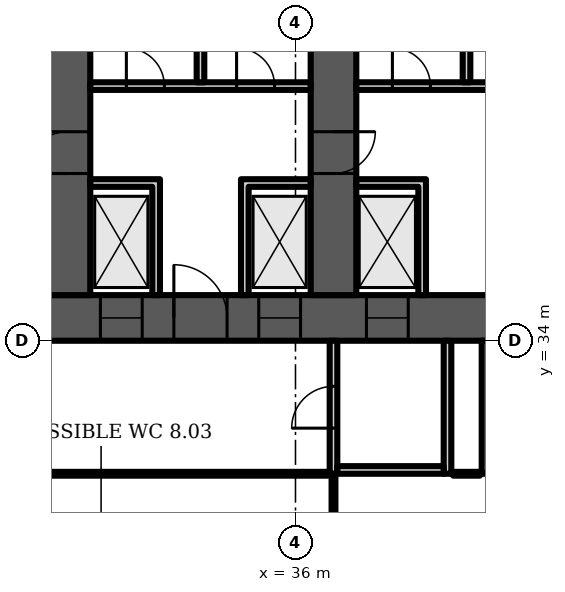
"""IFC4 building model, lengths in metres.
Left out: names, types, materials, properties, quantities, classifications, styles, units other than length and angle.
Written with IfcOpenShell. Run it as: python <this file> out.ifc"""

import sys

from ifc_helpers import new_model, si_unit, direction, frame, frame_2d, origin, place, context, subcontext, project, spatial, polyline, rectangle, outline, extrude, element, fill, save


model = new_model("IFC4")
c1 = context("Model", 3, precision=1e-05, world=origin(), true_north=direction((0.0, 1.0)))
c2 = subcontext(c1, "Body", "Model", "MODEL_VIEW")
j1 = project(units=[si_unit("LENGTHUNIT", "METRE"), si_unit("PLANEANGLEUNIT", "RADIAN")], contexts=[c1])
p1 = place(None, origin())
s1 = spatial("IfcSite", under=j1, at=p1, CompositionType="ELEMENT")
p2 = place(p1, origin())
s2 = spatial("IfcBuilding", under=s1, at=p2, CompositionType="ELEMENT")
p3 = place(p2, frame((0.0, 0.0, 48.7)))
s3 = spatial("IfcBuildingStorey", under=s2, at=p3, CompositionType="ELEMENT", Elevation=48.7)
p4 = place(p3, frame((9.0, 34.6, 0.0), z_axis=(0.0, 0.0, 1.0), x_axis=(1.0, 0.0, 0.0)))
e1 = element("IfcWall", 1, at=p4, inside=s3, PredefinedType="SHEAR", context=c2, shape_type="SweptSolid", body=[
    extrude(rectangle(XDim=56.0, YDim=1.2, at=frame_2d((28.0, 0.0))), origin(), (0.0, 0.0, 1.0), 3.6),
])
p5 = place(p4, frame((3.3, 0.0, 0.0)))
e2 = element("IfcOpeningElement", 2, at=p5, cuts=e1, PredefinedType="OPENING", context=c2, shape_type="SweptSolid", body=[
    extrude(rectangle(XDim=1.0, YDim=2.1, at=frame_2d((0.5, 1.05))), frame((0.0, 0.61, 0.0), z_axis=(0.0, -1.0, 0.0), x_axis=(1.0, 0.0, 0.0)), (0.0, 0.0, 1.0), 1.22),
])
p6 = place(p4, frame((7.867, 0.0, 0.0)))
e3 = element("IfcOpeningElement", 3, at=p6, cuts=e1, PredefinedType="OPENING", context=c2, shape_type="SweptSolid", body=[
    extrude(rectangle(XDim=1.1, YDim=2.1, at=frame_2d((0.55, 1.05))), frame((0.0, 0.61, 0.0), z_axis=(0.0, -1.0, 0.0), x_axis=(1.0, 0.0, 0.0)), (0.0, 0.0, 1.0), 1.22),
])
p7 = place(p4, frame((12.033, 0.0, 0.0)))
e4 = element("IfcOpeningElement", 4, at=p7, cuts=e1, PredefinedType="OPENING", context=c2, shape_type="SweptSolid", body=[
    extrude(rectangle(XDim=1.1, YDim=2.1, at=frame_2d((0.55, 1.05))), frame((0.0, 0.61, 0.0), z_axis=(0.0, -1.0, 0.0), x_axis=(1.0, 0.0, 0.0)), (0.0, 0.0, 1.0), 1.22),
])
p8 = place(p4, frame((9.8, 0.0, 0.0)))
e5 = element("IfcOpeningElement", 5, at=p8, cuts=e1, PredefinedType="OPENING", context=c2, shape_type="SweptSolid", body=[
    extrude(rectangle(XDim=1.4, YDim=2.1, at=frame_2d((0.7, 1.05))), frame((0.0, 0.61, 0.0), z_axis=(0.0, -1.0, 0.0), x_axis=(1.0, 0.0, 0.0)), (0.0, 0.0, 1.0), 1.22),
])
p9 = place(p4, frame((14.65, 0.0, 0.0)))
e6 = element("IfcOpeningElement", 6, at=p9, cuts=e1, PredefinedType="OPENING", context=c2, shape_type="SweptSolid", body=[
    extrude(rectangle(XDim=1.2, YDim=2.1, at=frame_2d((0.6, 1.05))), frame((0.0, 0.61, 0.0), z_axis=(0.0, -1.0, 0.0), x_axis=(1.0, 0.0, 0.0)), (0.0, 0.0, 1.0), 1.22),
])
p10 = place(p4, frame((21.867, 0.0, 0.0)))
e7 = element("IfcOpeningElement", 7, at=p10, cuts=e1, PredefinedType="OPENING", context=c2, shape_type="SweptSolid", body=[
    extrude(rectangle(XDim=1.1, YDim=2.1, at=frame_2d((0.55, 1.05))), frame((0.0, 0.61, 0.0), z_axis=(0.0, -1.0, 0.0), x_axis=(1.0, 0.0, 0.0)), (0.0, 0.0, 1.0), 1.22),
])
p11 = place(p4, frame((26.033, 0.0, 0.0)))
e8 = element("IfcOpeningElement", 8, at=p11, cuts=e1, PredefinedType="OPENING", context=c2, shape_type="SweptSolid", body=[
    extrude(rectangle(XDim=1.1, YDim=2.1, at=frame_2d((0.55, 1.05))), frame((0.0, 0.61, 0.0), z_axis=(0.0, -1.0, 0.0), x_axis=(1.0, 0.0, 0.0)), (0.0, 0.0, 1.0), 1.22),
])
p12 = place(p4, frame((23.8, 0.0, 0.0)))
e9 = element("IfcOpeningElement", 9, at=p12, cuts=e1, PredefinedType="OPENING", context=c2, shape_type="SweptSolid", body=[
    extrude(rectangle(XDim=1.4, YDim=2.1, at=frame_2d((0.7, 1.05))), frame((0.0, 0.61, 0.0), z_axis=(0.0, -1.0, 0.0), x_axis=(1.0, 0.0, 0.0)), (0.0, 0.0, 1.0), 1.22),
])
p13 = place(p4, frame((28.867, 0.0, 0.0)))
e10 = element("IfcOpeningElement", 10, at=p13, cuts=e1, PredefinedType="OPENING", context=c2, shape_type="SweptSolid", body=[
    extrude(rectangle(XDim=1.1, YDim=2.1, at=frame_2d((0.55, 1.05))), frame((0.0, 0.61, 0.0), z_axis=(0.0, -1.0, 0.0), x_axis=(1.0, 0.0, 0.0)), (0.0, 0.0, 1.0), 1.22),
])
p14 = place(p4, frame((33.033, 0.0, 0.0)))
e11 = element("IfcOpeningElement", 11, at=p14, cuts=e1, PredefinedType="OPENING", context=c2, shape_type="SweptSolid", body=[
    extrude(rectangle(XDim=1.1, YDim=2.1, at=frame_2d((0.55, 1.05))), frame((0.0, 0.61, 0.0), z_axis=(0.0, -1.0, 0.0), x_axis=(1.0, 0.0, 0.0)), (0.0, 0.0, 1.0), 1.22),
])
p15 = place(p4, frame((40.15, 0.0, 0.0)))
e12 = element("IfcOpeningElement", 12, at=p15, cuts=e1, PredefinedType="OPENING", context=c2, shape_type="SweptSolid", body=[
    extrude(rectangle(XDim=1.2, YDim=2.1, at=frame_2d((0.6, 1.05))), frame((0.0, 0.61, 0.0), z_axis=(0.0, -1.0, 0.0), x_axis=(1.0, 0.0, 0.0)), (0.0, 0.0, 1.0), 1.22),
])
p16 = place(p4, frame((44.8, 0.0, 0.0)))
e13 = element("IfcOpeningElement", 13, at=p16, cuts=e1, PredefinedType="OPENING", context=c2, shape_type="SweptSolid", body=[
    extrude(rectangle(XDim=1.4, YDim=2.1, at=frame_2d((0.7, 1.05))), frame((0.0, 0.61, 0.0), z_axis=(0.0, -1.0, 0.0), x_axis=(1.0, 0.0, 0.0)), (0.0, 0.0, 1.0), 1.22),
])
p17 = place(p4, frame((49.867, 0.0, 0.0)))
e14 = element("IfcOpeningElement", 14, at=p17, cuts=e1, PredefinedType="OPENING", context=c2, shape_type="SweptSolid", body=[
    extrude(rectangle(XDim=1.1, YDim=2.1, at=frame_2d((0.55, 1.05))), frame((0.0, 0.61, 0.0), z_axis=(0.0, -1.0, 0.0), x_axis=(1.0, 0.0, 0.0)), (0.0, 0.0, 1.0), 1.22),
])
p18 = place(p4, frame((53.5, 0.0, 0.0)))
e15 = element("IfcOpeningElement", 15, at=p18, cuts=e1, PredefinedType="OPENING", context=c2, shape_type="SweptSolid", body=[
    extrude(rectangle(XDim=1.1, YDim=2.1, at=frame_2d((0.55, 1.05))), frame((0.0, 0.61, 0.0), z_axis=(0.0, -1.0, 0.0), x_axis=(1.0, 0.0, 0.0)), (0.0, 0.0, 1.0), 1.22),
])
p19 = place(p4, frame((51.567, 0.0, 0.0)))
e16 = element("IfcOpeningElement", 16, at=p19, cuts=e1, PredefinedType="OPENING", context=c2, shape_type="SweptSolid", body=[
    extrude(rectangle(XDim=1.4, YDim=2.1, at=frame_2d((0.7, 1.05))), frame((0.0, 0.61, 0.0), z_axis=(0.0, -1.0, 0.0), x_axis=(1.0, 0.0, 0.0)), (0.0, 0.0, 1.0), 1.22),
])
p20 = place(p3, frame((30.0, 35.2, 0.0), z_axis=(0.0, 0.0, 1.0), x_axis=(0.0, 1.0, 0.0)))
e17 = element("IfcWall", 17, at=p20, inside=s3, PredefinedType="SHEAR", context=c2, shape_type="SweptSolid", body=[
    extrude(rectangle(XDim=14.168, YDim=1.2, at=frame_2d((7.084, 0.0))), origin(), (0.0, 0.0, 1.0), 3.6),
])
p21 = place(p20, frame((3.2, 0.0, 0.0)))
e18 = element("IfcOpeningElement", 18, at=p21, cuts=e17, PredefinedType="OPENING", context=c2, shape_type="SweptSolid", body=[
    extrude(rectangle(XDim=1.1, YDim=2.1, at=frame_2d((0.55, 1.05))), frame((0.0, 0.61, 0.0), z_axis=(0.0, -1.0, 0.0), x_axis=(1.0, 0.0, 0.0)), (0.0, 0.0, 1.0), 1.22),
])
p22 = place(p3, frame((37.0, 35.2, 0.0), z_axis=(0.0, 0.0, 1.0), x_axis=(0.0, 1.0, 0.0)))
e19 = element("IfcWall", 19, at=p22, inside=s3, PredefinedType="SHEAR", context=c2, shape_type="SweptSolid", body=[
    extrude(rectangle(XDim=14.78, YDim=1.2, at=frame_2d((7.39, 0.0))), origin(), (0.0, 0.0, 1.0), 3.6),
])
p23 = place(p22, frame((3.2, 0.0, 0.0)))
e20 = element("IfcOpeningElement", 20, at=p23, cuts=e19, PredefinedType="OPENING", context=c2, shape_type="SweptSolid", body=[
    extrude(rectangle(XDim=1.1, YDim=2.1, at=frame_2d((0.55, 1.05))), frame((0.0, 0.61, 0.0), z_axis=(0.0, -1.0, 0.0), x_axis=(1.0, 0.0, 0.0)), (0.0, 0.0, 1.0), 1.22),
])
p24 = place(p22, frame((9.6, 0.0, 0.0)))
e21 = element("IfcOpeningElement", 21, at=p24, cuts=e19, PredefinedType="OPENING", context=c2, shape_type="SweptSolid", body=[
    extrude(rectangle(XDim=1.0, YDim=2.1, at=frame_2d((0.5, 1.05))), frame((0.0, 0.61, 0.0), z_axis=(0.0, -1.0, 0.0), x_axis=(1.0, 0.0, 0.0)), (0.0, 0.0, 1.0), 1.22),
])
p25 = place(p3, frame((30.6, 40.7, 0.0), z_axis=(0.0, 0.0, 1.0), x_axis=(1.0, 0.0, 0.0)))
e22 = element("IfcWall", 22, at=p25, inside=s3, PredefinedType="PARTITIONING", context=c2, shape_type="SweptSolid", body=[
    extrude(rectangle(XDim=5.8, YDim=0.2, at=frame_2d((2.9, 0.0))), origin(), (0.0, 0.0, 1.0), 3.2),
])
p26 = place(p25, frame((0.95, 0.0, 0.0)))
e23 = element("IfcOpeningElement", 23, at=p26, cuts=e22, PredefinedType="OPENING", context=c2, shape_type="SweptSolid", body=[
    extrude(rectangle(XDim=1.0, YDim=2.1, at=frame_2d((0.5, 1.05))), frame((0.0, 0.11, 0.0), z_axis=(0.0, -1.0, 0.0), x_axis=(1.0, 0.0, 0.0)), (0.0, 0.0, 1.0), 0.22),
])
p27 = place(p25, frame((3.85, 0.0, 0.0)))
e24 = element("IfcOpeningElement", 24, at=p27, cuts=e22, PredefinedType="OPENING", context=c2, shape_type="SweptSolid", body=[
    extrude(rectangle(XDim=1.0, YDim=2.1, at=frame_2d((0.5, 1.05))), frame((0.0, 0.11, 0.0), z_axis=(0.0, -1.0, 0.0), x_axis=(1.0, 0.0, 0.0)), (0.0, 0.0, 1.0), 0.22),
])
p28 = place(p3, frame((0.0, 0.0, -0.0)))
e25 = element("IfcWall", 25, at=p28, inside=s3, PredefinedType="PARTITIONING", context=c2, shape_type="SweptSolid", body=[
    extrude(outline(polyline([(32.233, 38.05), (30.6, 38.05), (30.6, 38.25), (32.233, 38.25), (32.433, 38.25), (32.433, 35.2), (32.233, 35.2), (32.233, 38.05)])), origin(), (0.0, 0.0, 1.0), 3.2),
])
p29 = place(p3, frame((0.0, 0.0, -0.0)))
e26 = element("IfcWall", 26, at=p29, inside=s3, PredefinedType="PARTITIONING", context=c2, shape_type="SweptSolid", body=[
    extrude(outline(polyline([(34.567, 38.25), (34.767, 38.25), (36.4, 38.25), (36.4, 38.05), (34.767, 38.05), (34.767, 35.2), (34.567, 35.2), (34.567, 38.25)])), origin(), (0.0, 0.0, 1.0), 3.2),
])
p30 = place(p3, frame((33.5, 40.8, 0.0), z_axis=(0.0, 0.0, 1.0), x_axis=(0.0, 1.0, 0.0)))
e27 = element("IfcWall", 27, at=p30, inside=s3, PredefinedType="PARTITIONING", context=c2, shape_type="SweptSolid", body=[
    extrude(rectangle(XDim=8.653, YDim=0.2, at=frame_2d((4.326, 0.0))), origin(), (0.0, 0.0, 1.0), 3.2),
])
p31 = place(p3, frame((37.6, 40.7, 0.0), z_axis=(0.0, 0.0, 1.0), x_axis=(1.0, 0.0, 0.0)))
e28 = element("IfcWall", 28, at=p31, inside=s3, PredefinedType="PARTITIONING", context=c2, shape_type="SweptSolid", body=[
    extrude(rectangle(XDim=5.8, YDim=0.2, at=frame_2d((2.9, 0.0))), origin(), (0.0, 0.0, 1.0), 3.2),
])
p32 = place(p31, frame((0.95, 0.0, 0.0)))
e29 = element("IfcOpeningElement", 29, at=p32, cuts=e28, PredefinedType="OPENING", context=c2, shape_type="SweptSolid", body=[
    extrude(rectangle(XDim=1.0, YDim=2.1, at=frame_2d((0.5, 1.05))), frame((0.0, 0.11, 0.0), z_axis=(0.0, -1.0, 0.0), x_axis=(1.0, 0.0, 0.0)), (0.0, 0.0, 1.0), 0.22),
])
p33 = place(p31, frame((3.85, 0.0, 0.0)))
e30 = element("IfcOpeningElement", 30, at=p33, cuts=e28, PredefinedType="OPENING", context=c2, shape_type="SweptSolid", body=[
    extrude(rectangle(XDim=1.0, YDim=2.1, at=frame_2d((0.5, 1.05))), frame((0.0, 0.11, 0.0), z_axis=(0.0, -1.0, 0.0), x_axis=(1.0, 0.0, 0.0)), (0.0, 0.0, 1.0), 0.22),
])
p34 = place(p3, frame((0.0, 0.0, -0.0)))
e31 = element("IfcWall", 31, at=p34, inside=s3, PredefinedType="PARTITIONING", context=c2, shape_type="SweptSolid", body=[
    extrude(outline(polyline([(39.233, 38.05), (37.6, 38.05), (37.6, 38.25), (39.233, 38.25), (39.433, 38.25), (39.433, 35.2), (39.233, 35.2), (39.233, 38.05)])), origin(), (0.0, 0.0, 1.0), 3.2),
])
p35 = place(p3, frame((40.5, 40.8, 0.0), z_axis=(0.0, 0.0, 1.0), x_axis=(0.0, 1.0, 0.0)))
e32 = element("IfcWall", 32, at=p35, inside=s3, PredefinedType="PARTITIONING", context=c2, shape_type="SweptSolid", body=[
    extrude(rectangle(XDim=8.653, YDim=0.2, at=frame_2d((4.326, 0.0))), origin(), (0.0, 0.0, 1.0), 3.2),
])
p36 = place(p3, frame((37.0, 30.5, 0.0), z_axis=(0.0, 0.0, 1.0), x_axis=(0.0, 1.0, 0.0)))
e33 = element("IfcWall", 33, at=p36, inside=s3, PredefinedType="PARTITIONING", context=c2, shape_type="SweptSolid", body=[
    extrude(rectangle(XDim=3.5, YDim=0.2, at=frame_2d((1.75, 0.0))), origin(), (0.0, 0.0, 1.0), 3.2),
])
p37 = place(p36, frame((1.2, 0.0, 0.0)))
e34 = element("IfcOpeningElement", 34, at=p37, cuts=e33, PredefinedType="OPENING", context=c2, shape_type="SweptSolid", body=[
    extrude(rectangle(XDim=1.1, YDim=2.1, at=frame_2d((0.55, 1.05))), frame((0.0, 0.11, 0.0), z_axis=(0.0, -1.0, 0.0), x_axis=(1.0, 0.0, 0.0)), (0.0, 0.0, 1.0), 0.22),
])
p38 = place(p3, frame((40.0, 30.5, 0.0), z_axis=(0.0, 0.0, 1.0), x_axis=(0.0, 1.0, 0.0)))
e35 = element("IfcWall", 35, at=p38, inside=s3, PredefinedType="PARTITIONING", context=c2, shape_type="SweptSolid", body=[
    extrude(rectangle(XDim=3.5, YDim=0.2, at=frame_2d((1.75, 0.0))), origin(), (0.0, 0.0, 1.0), 3.2),
])
p39 = place(p3, frame((37.1, 30.6, 0.0), z_axis=(0.0, 0.0, 1.0), x_axis=(1.0, 0.0, 0.0)))
e36 = element("IfcWall", 36, at=p39, inside=s3, PredefinedType="PARTITIONING", context=c2, shape_type="SweptSolid", body=[
    extrude(rectangle(XDim=2.8, YDim=0.2, at=frame_2d((1.4, 0.0))), origin(), (0.0, 0.0, 1.0), 3.2),
])
p40 = place(p3, frame((41.0, 30.5, 0.0), z_axis=(0.0, 0.0, 1.0), x_axis=(0.0, 1.0, 0.0)))
e37 = element("IfcWall", 37, at=p40, inside=s3, PredefinedType="PARTITIONING", context=c2, shape_type="SweptSolid", body=[
    extrude(rectangle(XDim=3.5, YDim=0.2, at=frame_2d((1.75, 0.0))), origin(), (0.0, 0.0, 1.0), 3.2),
])
p41 = place(p3, frame((10.8, 30.5, 0.0), z_axis=(0.0, 0.0, 1.0), x_axis=(1.0, 0.0, 0.0)))
e38 = element("IfcWall", 38, at=p41, inside=s3, PredefinedType="PARTITIONING", context=c2, shape_type="SweptSolid", body=[
    extrude(rectangle(XDim=26.05, YDim=0.1, at=frame_2d((13.025, 0.0))), origin(), (0.0, 0.0, 1.0), 3.2),
])
p42 = place(p41, frame((0.235, 0.0, 0.0)))
e39 = element("IfcOpeningElement", 39, at=p42, cuts=e38, PredefinedType="OPENING", context=c2, shape_type="SweptSolid", body=[
    extrude(rectangle(XDim=1.0, YDim=2.1, at=frame_2d((0.5, 1.05))), frame((0.0, 0.06, 0.0), z_axis=(0.0, -1.0, 0.0), x_axis=(1.0, 0.0, 0.0)), (0.0, 0.0, 1.0), 0.12),
])
p43 = place(p41, frame((10.955, 0.0, 0.0)))
e40 = element("IfcOpeningElement", 40, at=p43, cuts=e38, PredefinedType="OPENING", context=c2, shape_type="SweptSolid", body=[
    extrude(rectangle(XDim=1.0, YDim=2.1, at=frame_2d((0.5, 1.05))), frame((0.0, 0.06, 0.0), z_axis=(0.0, -1.0, 0.0), x_axis=(1.0, 0.0, 0.0)), (0.0, 0.0, 1.0), 0.12),
])
p44 = place(p3, frame((37.0, 14.24, 0.0), z_axis=(0.0, 0.0, 1.0), x_axis=(0.0, 1.0, 0.0)))
e41 = element("IfcWall", 41, at=p44, inside=s3, PredefinedType="PARTITIONING", context=c2, shape_type="SweptSolid", body=[
    extrude(rectangle(XDim=16.26, YDim=0.1, at=frame_2d((8.13, 0.0))), origin(), (0.0, 0.0, 1.0), 3.2),
])
p45 = place(p3, frame((40.15, 30.5, 0.0), z_axis=(0.0, 0.0, 1.0), x_axis=(1.0, 0.0, 0.0)))
e42 = element("IfcWall", 42, at=p45, inside=s3, PredefinedType="PARTITIONING", context=c2, shape_type="SweptSolid", body=[
    extrude(rectangle(XDim=0.7, YDim=0.1, at=frame_2d((0.35, 0.0))), origin(), (0.0, 0.0, 1.0), 3.2),
])
p46 = place(p10, origin())
e43 = element("IfcDoor", 43, at=p46, inside=s3, OperationType="DOUBLE_DOOR_SLIDING", PredefinedType="DOOR", context=c2, shape_type="SweptSolid", body=[
    extrude(rectangle(XDim=1.1, YDim=2.1, at=frame_2d((0.55, 1.05))), frame((0.0, 0.025, 0.0), z_axis=(0.0, -1.0, 0.0), x_axis=(1.0, 0.0, 0.0)), (0.0, 0.0, 1.0), 0.05),
])
fill(e7, e43)
p47 = place(p11, origin())
e44 = element("IfcDoor", 44, at=p47, inside=s3, OperationType="DOUBLE_DOOR_SLIDING", PredefinedType="DOOR", context=c2, shape_type="SweptSolid", body=[
    extrude(rectangle(XDim=1.1, YDim=2.1, at=frame_2d((0.55, 1.05))), frame((0.0, 0.025, 0.0), z_axis=(0.0, -1.0, 0.0), x_axis=(1.0, 0.0, 0.0)), (0.0, 0.0, 1.0), 0.05),
])
fill(e8, e44)
p48 = place(p12, origin())
e45 = element("IfcDoor", 45, at=p48, inside=s3, OperationType="DOUBLE_DOOR_SINGLE_SWING", PredefinedType="DOOR", context=c2, shape_type="SweptSolid", body=[
    extrude(rectangle(XDim=1.4, YDim=2.1, at=frame_2d((0.7, 1.05))), frame((0.0, 0.025, 0.0), z_axis=(0.0, -1.0, 0.0), x_axis=(1.0, 0.0, 0.0)), (0.0, 0.0, 1.0), 0.05),
])
fill(e9, e45)
p49 = place(p26, origin())
e46 = element("IfcDoor", 46, at=p49, inside=s3, OperationType="SINGLE_SWING_LEFT", PredefinedType="DOOR", context=c2, shape_type="SweptSolid", body=[
    extrude(rectangle(XDim=1.0, YDim=2.1, at=frame_2d((0.5, 1.05))), frame((0.0, 0.025, 0.0), z_axis=(0.0, -1.0, 0.0), x_axis=(1.0, 0.0, 0.0)), (0.0, 0.0, 1.0), 0.05),
])
fill(e23, e46)
p50 = place(p27, origin())
e47 = element("IfcDoor", 47, at=p50, inside=s3, OperationType="SINGLE_SWING_LEFT", PredefinedType="DOOR", context=c2, shape_type="SweptSolid", body=[
    extrude(rectangle(XDim=1.0, YDim=2.1, at=frame_2d((0.5, 1.05))), frame((0.0, 0.025, 0.0), z_axis=(0.0, -1.0, 0.0), x_axis=(1.0, 0.0, 0.0)), (0.0, 0.0, 1.0), 0.05),
])
fill(e24, e47)
p51 = place(p13, origin())
e48 = element("IfcDoor", 48, at=p51, inside=s3, OperationType="DOUBLE_DOOR_SLIDING", PredefinedType="DOOR", context=c2, shape_type="SweptSolid", body=[
    extrude(rectangle(XDim=1.1, YDim=2.1, at=frame_2d((0.55, 1.05))), frame((0.0, 0.025, 0.0), z_axis=(0.0, -1.0, 0.0), x_axis=(1.0, 0.0, 0.0)), (0.0, 0.0, 1.0), 0.05),
])
fill(e10, e48)
p52 = place(p32, origin())
e49 = element("IfcDoor", 49, at=p52, inside=s3, OperationType="SINGLE_SWING_LEFT", PredefinedType="DOOR", context=c2, shape_type="SweptSolid", body=[
    extrude(rectangle(XDim=1.0, YDim=2.1, at=frame_2d((0.5, 1.05))), frame((0.0, 0.025, 0.0), z_axis=(0.0, -1.0, 0.0), x_axis=(1.0, 0.0, 0.0)), (0.0, 0.0, 1.0), 0.05),
])
fill(e29, e49)
p53 = place(p21, origin())
e50 = element("IfcDoor", 50, at=p53, inside=s3, OperationType="SINGLE_SWING_LEFT", PredefinedType="DOOR", context=c2, shape_type="SweptSolid", body=[
    extrude(rectangle(XDim=1.1, YDim=2.1, at=frame_2d((0.55, 1.05))), frame((0.0, 0.025, 0.0), z_axis=(0.0, -1.0, 0.0), x_axis=(1.0, 0.0, 0.0)), (0.0, 0.0, 1.0), 0.05),
])
fill(e18, e50)
p54 = place(p23, origin())
e51 = element("IfcDoor", 51, at=p54, inside=s3, OperationType="SINGLE_SWING_RIGHT", PredefinedType="DOOR", context=c2, shape_type="SweptSolid", body=[
    extrude(rectangle(XDim=1.1, YDim=2.1, at=frame_2d((0.55, 1.05))), frame((0.0, 0.025, 0.0), z_axis=(0.0, -1.0, 0.0), x_axis=(1.0, 0.0, 0.0)), (0.0, 0.0, 1.0), 0.05),
])
fill(e20, e51)
p55 = place(p37, origin())
e52 = element("IfcDoor", 52, at=p55, inside=s3, OperationType="SINGLE_SWING_LEFT", PredefinedType="DOOR", context=c2, shape_type="SweptSolid", body=[
    extrude(rectangle(XDim=1.1, YDim=2.1, at=frame_2d((0.55, 1.05))), frame((0.0, 0.025, 0.0), z_axis=(0.0, -1.0, 0.0), x_axis=(1.0, 0.0, 0.0)), (0.0, 0.0, 1.0), 0.05),
])
fill(e34, e52)
save(model, sys.argv[1])
